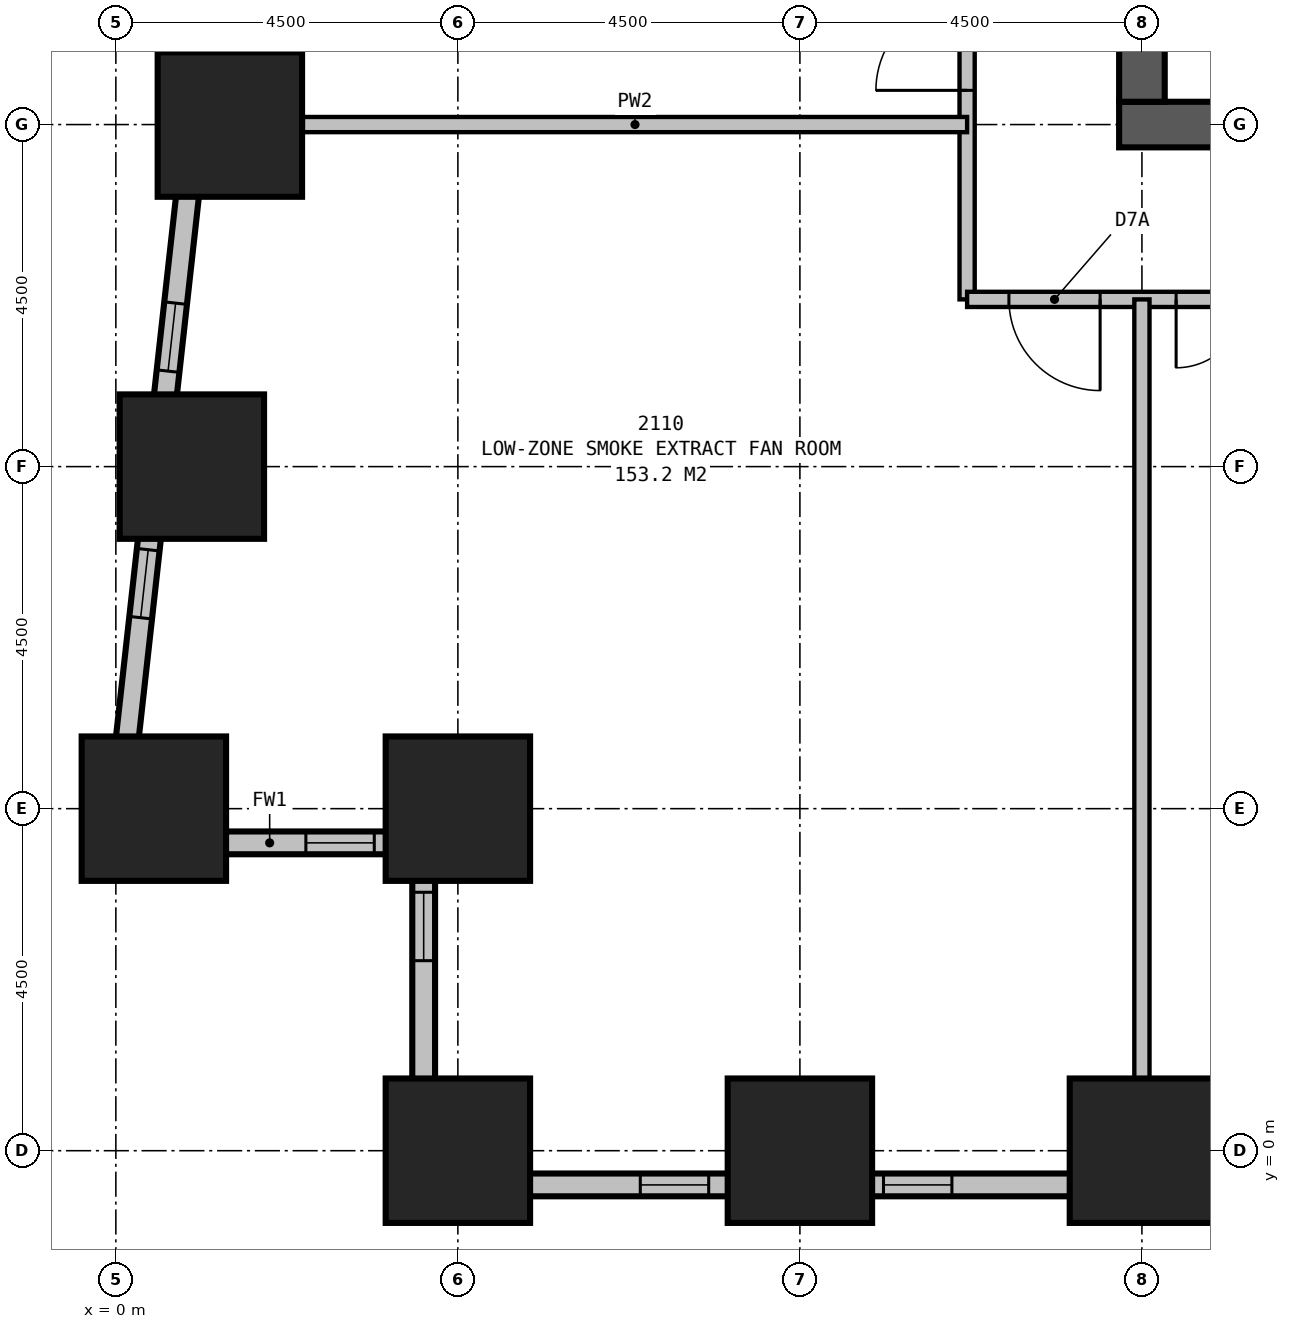
"""IFC4 building model, lengths in metres.
Left out: names, types, materials, properties, quantities, classifications, styles, units other than length and angle.
Written with IfcOpenShell. Run it as: python <this file> out.ifc"""

import sys

from ifc_helpers import new_model, si_unit, direction, frame, frame_2d, origin, origin_2d, place, context, subcontext, project, spatial, rectangle, extrude, element, fill, save


model = new_model("IFC4")
c1 = context("Model", 3, precision=1e-05, world=origin(), true_north=direction((0.0, 1.0)))
c2 = subcontext(c1, "Body", "Model", "MODEL_VIEW")
j1 = project(units=[si_unit("LENGTHUNIT", "METRE"), si_unit("PLANEANGLEUNIT", "RADIAN")], contexts=[c1])
p1 = place(None, origin())
s1 = spatial("IfcSite", under=j1, at=p1, CompositionType="ELEMENT")
p2 = place(p1, origin())
s2 = spatial("IfcBuilding", under=s1, at=p2, CompositionType="ELEMENT")
p3 = place(p2, frame((0.0, 0.0, 85.7)))
s3 = spatial("IfcBuildingStorey", under=s2, at=p3, CompositionType="ELEMENT", Elevation=85.7)
for number, where, z_axis, x_axis in (
    (1, (0.5, 4.5, 0.0), (0.0, 0.0, 1.0), (1.0, 0.0, 0.0)),
    (2, (4.5, 4.5, 0.0), (0.0, 0.0, 1.0), (1.0, 0.0, 0.0)),
    (3, (4.5, 0.0, 0.0), (0.0, 0.0, 1.0), (1.0, 0.0, 0.0)),
    (4, (9.0, 0.0, 0.0), (0.0, 0.0, 1.0), (1.0, 0.0, 0.0)),
    (5, (13.5, 0.0, 0.0), (0.0, 0.0, 1.0), (1.0, 0.0, 0.0)),
    (6, (1.5, 13.5, 0.0), (0.0, 0.0, 1.0), (1.0, 0.0, 0.0)),
    (7, (1.0, 9.0, 0.0), (0.0, 0.0, 1.0), (1.0, 0.0, 0.0)),
):
    element("IfcColumn", number, at=place(p3, frame(where, z_axis=z_axis, x_axis=x_axis)), inside=s3, PredefinedType="COLUMN", context=c2, shape_type="SweptSolid", body=[
        extrude(rectangle(XDim=1.9, YDim=1.9, at=origin_2d()), origin(), (0.0, 0.0, 1.0), 4.2),
    ])
p4 = place(p3, frame((13.2, 13.5, 0.0), z_axis=(0.0, 0.0, 1.0), x_axis=(1.0, 0.0, 0.0)))
e8 = element("IfcWall", 8, at=p4, inside=s3, PredefinedType="SHEAR", context=c2, shape_type="SweptSolid", body=[
    extrude(rectangle(XDim=23.1, YDim=0.6, at=frame_2d((11.55, 0.0))), origin(), (0.0, 0.0, 1.0), 4.2),
])
p5 = place(p3, frame((13.5, 16.5, 0.0), z_axis=(0.0, 0.0, 1.0), x_axis=(0.0, -1.0, 0.0)))
e9 = element("IfcWall", 9, at=p5, inside=s3, PredefinedType="SHEAR", context=c2, shape_type="SweptSolid", body=[
    extrude(rectangle(XDim=2.7, YDim=0.6, at=frame_2d((1.35, 0.0))), origin(), (0.0, 0.0, 1.0), 4.2),
])
p6 = place(p3, frame((-0.153, 4.05, 0.0), z_axis=(0.0, 0.0, 1.0), x_axis=(1.0, 0.0, 0.0)))
e10 = element("IfcWall", 10, at=p6, inside=s3, PredefinedType="STANDARD", context=c2, shape_type="SweptSolid", body=[
    extrude(rectangle(XDim=4.353, YDim=0.3, at=frame_2d((2.176, 0.0))), origin(), (0.0, 0.0, 1.0), 2.85),
])
p7 = place(p6, frame((2.653, 0.0, 0.3)))
e11 = element("IfcOpeningElement", 11, at=p7, cuts=e10, PredefinedType="OPENING", context=c2, shape_type="SweptSolid", body=[
    extrude(rectangle(XDim=0.9, YDim=1.2, at=frame_2d((0.45, 0.6))), frame((0.0, 0.16, 0.0), z_axis=(0.0, -1.0, 0.0), x_axis=(1.0, 0.0, 0.0)), (0.0, 0.0, 1.0), 0.32),
])
p8 = place(p3, frame((4.05, 4.2, 0.0), z_axis=(0.0, 0.0, 1.0), x_axis=(0.0, -1.0, 0.0)))
e12 = element("IfcWall", 12, at=p8, inside=s3, PredefinedType="STANDARD", context=c2, shape_type="SweptSolid", body=[
    extrude(rectangle(XDim=4.8, YDim=0.3, at=frame_2d((2.4, 0.0))), origin(), (0.0, 0.0, 1.0), 2.85),
])
p9 = place(p8, frame((0.8, 0.0, 0.5)))
e13 = element("IfcOpeningElement", 13, at=p9, cuts=e12, PredefinedType="OPENING", context=c2, shape_type="SweptSolid", body=[
    extrude(rectangle(XDim=0.9, YDim=1.2, at=frame_2d((0.45, 0.6))), frame((0.0, 0.16, 0.0), z_axis=(0.0, -1.0, 0.0), x_axis=(1.0, 0.0, 0.0)), (0.0, 0.0, 1.0), 0.32),
])
p10 = place(p3, frame((3.9, -0.45, 0.0), z_axis=(0.0, 0.0, 1.0), x_axis=(1.0, 0.0, 0.0)))
e14 = element("IfcWall", 14, at=p10, inside=s3, PredefinedType="STANDARD", context=c2, shape_type="SweptSolid", body=[
    extrude(rectangle(XDim=41.7, YDim=0.3, at=frame_2d((20.85, 0.0))), origin(), (0.0, 0.0, 1.0), 2.85),
])
p11 = place(p10, frame((3.0, 0.0, 0.5)))
e15 = element("IfcOpeningElement", 15, at=p11, cuts=e14, PredefinedType="OPENING", context=c2, shape_type="SweptSolid", body=[
    extrude(rectangle(XDim=0.9, YDim=1.2, at=frame_2d((0.45, 0.6))), frame((0.0, 0.16, 0.0), z_axis=(0.0, -1.0, 0.0), x_axis=(1.0, 0.0, 0.0)), (0.0, 0.0, 1.0), 0.32),
])
p12 = place(p10, frame((6.2, 0.0, 0.5)))
e16 = element("IfcOpeningElement", 16, at=p12, cuts=e14, PredefinedType="OPENING", context=c2, shape_type="SweptSolid", body=[
    extrude(rectangle(XDim=0.9, YDim=1.2, at=frame_2d((0.45, 0.6))), frame((0.0, 0.16, 0.0), z_axis=(0.0, -1.0, 0.0), x_axis=(1.0, 0.0, 0.0)), (0.0, 0.0, 1.0), 0.32),
])
p13 = place(p10, frame((12.0, 0.0, 0.5)))
e17 = element("IfcOpeningElement", 17, at=p13, cuts=e14, PredefinedType="OPENING", context=c2, shape_type="SweptSolid", body=[
    extrude(rectangle(XDim=0.9, YDim=1.2, at=frame_2d((0.45, 0.6))), frame((0.0, 0.16, 0.0), z_axis=(0.0, -1.0, 0.0), x_axis=(1.0, 0.0, 0.0)), (0.0, 0.0, 1.0), 0.32),
])
p14 = place(p10, frame((15.2, 0.0, 0.5)))
e18 = element("IfcOpeningElement", 18, at=p14, cuts=e14, PredefinedType="OPENING", context=c2, shape_type="SweptSolid", body=[
    extrude(rectangle(XDim=0.9, YDim=1.2, at=frame_2d((0.45, 0.6))), frame((0.0, 0.16, 0.0), z_axis=(0.0, -1.0, 0.0), x_axis=(1.0, 0.0, 0.0)), (0.0, 0.0, 1.0), 0.32),
])
p15 = place(p10, frame((21.0, 0.0, 0.5)))
e19 = element("IfcOpeningElement", 19, at=p15, cuts=e14, PredefinedType="OPENING", context=c2, shape_type="SweptSolid", body=[
    extrude(rectangle(XDim=0.9, YDim=1.2, at=frame_2d((0.45, 0.6))), frame((0.0, 0.16, 0.0), z_axis=(0.0, -1.0, 0.0), x_axis=(1.0, 0.0, 0.0)), (0.0, 0.0, 1.0), 0.32),
])
p16 = place(p10, frame((24.2, 0.0, 0.5)))
e20 = element("IfcOpeningElement", 20, at=p16, cuts=e14, PredefinedType="OPENING", context=c2, shape_type="SweptSolid", body=[
    extrude(rectangle(XDim=0.9, YDim=1.2, at=frame_2d((0.45, 0.6))), frame((0.0, 0.16, 0.0), z_axis=(0.0, -1.0, 0.0), x_axis=(1.0, 0.0, 0.0)), (0.0, 0.0, 1.0), 0.32),
])
p17 = place(p10, frame((30.0, 0.0, 0.5)))
e21 = element("IfcOpeningElement", 21, at=p17, cuts=e14, PredefinedType="OPENING", context=c2, shape_type="SweptSolid", body=[
    extrude(rectangle(XDim=0.9, YDim=1.2, at=frame_2d((0.45, 0.6))), frame((0.0, 0.16, 0.0), z_axis=(0.0, -1.0, 0.0), x_axis=(1.0, 0.0, 0.0)), (0.0, 0.0, 1.0), 0.32),
])
p18 = place(p10, frame((33.2, 0.0, 0.5)))
e22 = element("IfcOpeningElement", 22, at=p18, cuts=e14, PredefinedType="OPENING", context=c2, shape_type="SweptSolid", body=[
    extrude(rectangle(XDim=0.9, YDim=1.2, at=frame_2d((0.45, 0.6))), frame((0.0, 0.16, 0.0), z_axis=(0.0, -1.0, 0.0), x_axis=(1.0, 0.0, 0.0)), (0.0, 0.0, 1.0), 0.32),
])
p19 = place(p10, frame((39.0, 0.0, 0.5)))
e23 = element("IfcOpeningElement", 23, at=p19, cuts=e14, PredefinedType="OPENING", context=c2, shape_type="SweptSolid", body=[
    extrude(rectangle(XDim=0.9, YDim=1.2, at=frame_2d((0.45, 0.6))), frame((0.0, 0.16, 0.0), z_axis=(0.0, -1.0, 0.0), x_axis=(1.0, 0.0, 0.0)), (0.0, 0.0, 1.0), 0.32),
])
p20 = place(p3, frame((3.614, 36.599, 0.0), z_axis=(0.0, 0.0, 1.0), x_axis=(-0.110429082637, -0.993884006164, 0.0)))
e24 = element("IfcWall", 24, at=p20, inside=s3, PredefinedType="STANDARD", context=c2, shape_type="SweptSolid", body=[
    extrude(rectangle(XDim=32.899, YDim=0.3, at=frame_2d((16.45, 0.0))), origin(), (0.0, 0.0, 1.0), 2.85),
])
p21 = place(p20, frame((1.703, 0.0, 0.5)))
e25 = element("IfcOpeningElement", 25, at=p21, cuts=e24, PredefinedType="OPENING", context=c2, shape_type="SweptSolid", body=[
    extrude(rectangle(XDim=0.9, YDim=1.2, at=frame_2d((0.45, 0.6))), frame((0.0, 0.16, 0.0), z_axis=(0.0, -1.0, 0.0), x_axis=(1.0, 0.0, 0.0)), (0.0, 0.0, 1.0), 0.32),
])
p22 = place(p20, frame((7.495, 0.0, 0.5)))
e26 = element("IfcOpeningElement", 26, at=p22, cuts=e24, PredefinedType="OPENING", context=c2, shape_type="SweptSolid", body=[
    extrude(rectangle(XDim=0.9, YDim=1.2, at=frame_2d((0.45, 0.6))), frame((0.0, 0.16, 0.0), z_axis=(0.0, -1.0, 0.0), x_axis=(1.0, 0.0, 0.0)), (0.0, 0.0, 1.0), 0.32),
])
p23 = place(p20, frame((10.758, 0.0, 0.5)))
e27 = element("IfcOpeningElement", 27, at=p23, cuts=e24, PredefinedType="OPENING", context=c2, shape_type="SweptSolid", body=[
    extrude(rectangle(XDim=0.9, YDim=1.2, at=frame_2d((0.45, 0.6))), frame((0.0, 0.16, 0.0), z_axis=(0.0, -1.0, 0.0), x_axis=(1.0, 0.0, 0.0)), (0.0, 0.0, 1.0), 0.32),
])
p24 = place(p20, frame((16.55, 0.0, 0.5)))
e28 = element("IfcOpeningElement", 28, at=p24, cuts=e24, PredefinedType="OPENING", context=c2, shape_type="SweptSolid", body=[
    extrude(rectangle(XDim=0.9, YDim=1.2, at=frame_2d((0.45, 0.6))), frame((0.0, 0.16, 0.0), z_axis=(0.0, -1.0, 0.0), x_axis=(1.0, 0.0, 0.0)), (0.0, 0.0, 1.0), 0.32),
])
p25 = place(p20, frame((19.814, 0.0, 0.5)))
e29 = element("IfcOpeningElement", 29, at=p25, cuts=e24, PredefinedType="OPENING", context=c2, shape_type="SweptSolid", body=[
    extrude(rectangle(XDim=0.9, YDim=1.2, at=frame_2d((0.45, 0.6))), frame((0.0, 0.16, 0.0), z_axis=(0.0, -1.0, 0.0), x_axis=(1.0, 0.0, 0.0)), (0.0, 0.0, 1.0), 0.32),
])
p26 = place(p20, frame((25.605, 0.0, 0.5)))
e30 = element("IfcOpeningElement", 30, at=p26, cuts=e24, PredefinedType="OPENING", context=c2, shape_type="SweptSolid", body=[
    extrude(rectangle(XDim=0.9, YDim=1.2, at=frame_2d((0.45, 0.6))), frame((0.0, 0.16, 0.0), z_axis=(0.0, -1.0, 0.0), x_axis=(1.0, 0.0, 0.0)), (0.0, 0.0, 1.0), 0.32),
])
p27 = place(p20, frame((28.869, 0.0, 0.5)))
e31 = element("IfcOpeningElement", 31, at=p27, cuts=e24, PredefinedType="OPENING", context=c2, shape_type="SweptSolid", body=[
    extrude(rectangle(XDim=0.9, YDim=1.2, at=frame_2d((0.45, 0.6))), frame((0.0, 0.16, 0.0), z_axis=(0.0, -1.0, 0.0), x_axis=(1.0, 0.0, 0.0)), (0.0, 0.0, 1.0), 0.32),
])
p28 = place(p3, frame((11.2, 11.2, 0.0), z_axis=(0.0, 0.0, 1.0), x_axis=(1.0, 0.0, 0.0)))
e32 = element("IfcWall", 32, at=p28, inside=s3, PredefinedType="PARTITIONING", context=c2, shape_type="SweptSolid", body=[
    extrude(rectangle(XDim=27.1, YDim=0.2, at=frame_2d((13.55, 0.0))), origin(), (0.0, 0.0, 1.0), 3.95),
])
p29 = place(p28, frame((4.55, 0.0, 0.0), z_axis=(0.0, 0.0, 1.0), x_axis=(-1.0, 0.0, 0.0)))
e33 = element("IfcOpeningElement", 33, at=p29, cuts=e32, PredefinedType="OPENING", context=c2, shape_type="SweptSolid", body=[
    extrude(rectangle(XDim=1.8, YDim=2.4, at=frame_2d((0.9, 1.2))), frame((0.0, 0.11, 0.0), z_axis=(0.0, -1.0, 0.0), x_axis=(1.0, 0.0, 0.0)), (0.0, 0.0, 1.0), 0.22),
])
p30 = place(p28, frame((22.0, 0.0, 0.0), z_axis=(0.0, 0.0, 1.0), x_axis=(-1.0, 0.0, 0.0)))
e34 = element("IfcOpeningElement", 34, at=p30, cuts=e32, PredefinedType="OPENING", context=c2, shape_type="SweptSolid", body=[
    extrude(rectangle(XDim=1.0, YDim=2.1, at=frame_2d((0.5, 1.05))), frame((0.0, 0.11, 0.0), z_axis=(0.0, -1.0, 0.0), x_axis=(1.0, 0.0, 0.0)), (0.0, 0.0, 1.0), 0.22),
])
p31 = place(p28, frame((24.1, 0.0, 0.0), z_axis=(0.0, 0.0, 1.0), x_axis=(-1.0, 0.0, 0.0)))
e35 = element("IfcOpeningElement", 35, at=p31, cuts=e32, PredefinedType="OPENING", context=c2, shape_type="SweptSolid", body=[
    extrude(rectangle(XDim=1.0, YDim=2.1, at=frame_2d((0.5, 1.05))), frame((0.0, 0.11, 0.0), z_axis=(0.0, -1.0, 0.0), x_axis=(1.0, 0.0, 0.0)), (0.0, 0.0, 1.0), 0.22),
])
p32 = place(p28, frame((1.75, 0.0, 0.0), z_axis=(0.0, 0.0, 1.0), x_axis=(-1.0, 0.0, 0.0)))
e36 = element("IfcOpeningElement", 36, at=p32, cuts=e32, PredefinedType="OPENING", context=c2, shape_type="SweptSolid", body=[
    extrude(rectangle(XDim=1.2, YDim=2.1, at=frame_2d((0.6, 1.05))), frame((0.0, 0.11, 0.0), z_axis=(0.0, -1.0, 0.0), x_axis=(1.0, 0.0, 0.0)), (0.0, 0.0, 1.0), 0.22),
])
p33 = place(p28, frame((26.55, 0.0, 0.0), z_axis=(0.0, 0.0, 1.0), x_axis=(-1.0, 0.0, 0.0)))
e37 = element("IfcOpeningElement", 37, at=p33, cuts=e32, PredefinedType="OPENING", context=c2, shape_type="SweptSolid", body=[
    extrude(rectangle(XDim=1.2, YDim=2.1, at=frame_2d((0.6, 1.05))), frame((0.0, 0.11, 0.0), z_axis=(0.0, -1.0, 0.0), x_axis=(1.0, 0.0, 0.0)), (0.0, 0.0, 1.0), 0.22),
])
p34 = place(p3, frame((11.2, 11.2, 0.0), z_axis=(0.0, 0.0, 1.0), x_axis=(0.0, 1.0, 0.0)))
e38 = element("IfcWall", 38, at=p34, inside=s3, PredefinedType="PARTITIONING", context=c2, shape_type="SweptSolid", body=[
    extrude(rectangle(XDim=18.1, YDim=0.2, at=frame_2d((9.05, 0.0))), origin(), (0.0, 0.0, 1.0), 3.95),
])
p35 = place(p34, frame((2.75, 0.0, 0.0)))
e39 = element("IfcOpeningElement", 39, at=p35, cuts=e38, PredefinedType="OPENING", context=c2, shape_type="SweptSolid", body=[
    extrude(rectangle(XDim=1.2, YDim=2.1, at=frame_2d((0.6, 1.05))), frame((0.0, 0.11, 0.0), z_axis=(0.0, -1.0, 0.0), x_axis=(1.0, 0.0, 0.0)), (0.0, 0.0, 1.0), 0.22),
])
p36 = place(p34, frame((11.75, 0.0, 0.0)))
e40 = element("IfcOpeningElement", 40, at=p36, cuts=e38, PredefinedType="OPENING", context=c2, shape_type="SweptSolid", body=[
    extrude(rectangle(XDim=1.0, YDim=2.1, at=frame_2d((0.5, 1.05))), frame((0.0, 0.11, 0.0), z_axis=(0.0, -1.0, 0.0), x_axis=(1.0, 0.0, 0.0)), (0.0, 0.0, 1.0), 0.22),
])
p37 = place(p3, frame((13.5, 11.2, 0.0), z_axis=(0.0, 0.0, 1.0), x_axis=(0.0, -1.0, 0.0)))
e41 = element("IfcWall", 41, at=p37, inside=s3, PredefinedType="PARTITIONING", context=c2, shape_type="SweptSolid", body=[
    extrude(rectangle(XDim=10.25, YDim=0.2, at=frame_2d((5.125, 0.0))), origin(), (0.0, 0.0, 1.0), 2.95),
])
p38 = place(p3, frame((11.2, 13.5, 0.0), z_axis=(0.0, 0.0, 1.0), x_axis=(-1.0, 0.0, 0.0)))
e42 = element("IfcWall", 42, at=p38, inside=s3, PredefinedType="PARTITIONING", context=c2, shape_type="SweptSolid", body=[
    extrude(rectangle(XDim=8.739, YDim=0.2, at=frame_2d((4.37, 0.0))), origin(), (0.0, 0.0, 1.0), 2.65),
])
p39 = place(p7, origin())
e43 = element("IfcWindow", 43, at=p39, inside=s3, PartitioningType="SINGLE_PANEL", PredefinedType="USERDEFINED", context=c2, shape_type="SweptSolid", body=[
    extrude(rectangle(XDim=0.9, YDim=1.2, at=frame_2d((0.45, 0.6))), frame((0.0, 0.03, 0.0), z_axis=(0.0, -1.0, 0.0), x_axis=(1.0, 0.0, 0.0)), (0.0, 0.0, 1.0), 0.06),
])
fill(e11, e43)
p40 = place(p9, origin())
e44 = element("IfcWindow", 44, at=p40, inside=s3, PartitioningType="SINGLE_PANEL", PredefinedType="USERDEFINED", context=c2, shape_type="SweptSolid", body=[
    extrude(rectangle(XDim=0.9, YDim=1.2, at=frame_2d((0.45, 0.6))), frame((0.0, 0.03, 0.0), z_axis=(0.0, -1.0, 0.0), x_axis=(1.0, 0.0, 0.0)), (0.0, 0.0, 1.0), 0.06),
])
fill(e13, e44)
p41 = place(p11, origin())
e45 = element("IfcWindow", 45, at=p41, inside=s3, PartitioningType="SINGLE_PANEL", PredefinedType="USERDEFINED", context=c2, shape_type="SweptSolid", body=[
    extrude(rectangle(XDim=0.9, YDim=1.2, at=frame_2d((0.45, 0.6))), frame((0.0, 0.03, 0.0), z_axis=(0.0, -1.0, 0.0), x_axis=(1.0, 0.0, 0.0)), (0.0, 0.0, 1.0), 0.06),
])
fill(e15, e45)
p42 = place(p12, origin())
e46 = element("IfcWindow", 46, at=p42, inside=s3, PartitioningType="SINGLE_PANEL", PredefinedType="USERDEFINED", context=c2, shape_type="SweptSolid", body=[
    extrude(rectangle(XDim=0.9, YDim=1.2, at=frame_2d((0.45, 0.6))), frame((0.0, 0.03, 0.0), z_axis=(0.0, -1.0, 0.0), x_axis=(1.0, 0.0, 0.0)), (0.0, 0.0, 1.0), 0.06),
])
fill(e16, e46)
p43 = place(p26, origin())
e47 = element("IfcWindow", 47, at=p43, inside=s3, PartitioningType="SINGLE_PANEL", PredefinedType="USERDEFINED", context=c2, shape_type="SweptSolid", body=[
    extrude(rectangle(XDim=0.9, YDim=1.2, at=frame_2d((0.45, 0.6))), frame((0.0, 0.03, 0.0), z_axis=(0.0, -1.0, 0.0), x_axis=(1.0, 0.0, 0.0)), (0.0, 0.0, 1.0), 0.06),
])
fill(e30, e47)
p44 = place(p27, origin())
e48 = element("IfcWindow", 48, at=p44, inside=s3, PartitioningType="SINGLE_PANEL", PredefinedType="USERDEFINED", context=c2, shape_type="SweptSolid", body=[
    extrude(rectangle(XDim=0.9, YDim=1.2, at=frame_2d((0.45, 0.6))), frame((0.0, 0.03, 0.0), z_axis=(0.0, -1.0, 0.0), x_axis=(1.0, 0.0, 0.0)), (0.0, 0.0, 1.0), 0.06),
])
fill(e31, e48)
p45 = place(p29, origin())
e49 = element("IfcDoor", 49, at=p45, inside=s3, OperationType="DOUBLE_DOOR_SINGLE_SWING", PredefinedType="DOOR", context=c2, shape_type="SweptSolid", body=[
    extrude(rectangle(XDim=1.8, YDim=2.4, at=frame_2d((0.9, 1.2))), frame((0.0, 0.025, 0.0), z_axis=(0.0, -1.0, 0.0), x_axis=(1.0, 0.0, 0.0)), (0.0, 0.0, 1.0), 0.05),
])
fill(e33, e49)
p46 = place(p32, origin())
e50 = element("IfcDoor", 50, at=p46, inside=s3, OperationType="SINGLE_SWING_LEFT", PredefinedType="DOOR", context=c2, shape_type="SweptSolid", body=[
    extrude(rectangle(XDim=1.2, YDim=2.1, at=frame_2d((0.6, 1.05))), frame((0.0, 0.025, 0.0), z_axis=(0.0, -1.0, 0.0), x_axis=(1.0, 0.0, 0.0)), (0.0, 0.0, 1.0), 0.05),
])
fill(e36, e50)
p47 = place(p35, origin())
e51 = element("IfcDoor", 51, at=p47, inside=s3, OperationType="SINGLE_SWING_LEFT", PredefinedType="DOOR", context=c2, shape_type="SweptSolid", body=[
    extrude(rectangle(XDim=1.2, YDim=2.1, at=frame_2d((0.6, 1.05))), frame((0.0, 0.025, 0.0), z_axis=(0.0, -1.0, 0.0), x_axis=(1.0, 0.0, 0.0)), (0.0, 0.0, 1.0), 0.05),
])
fill(e39, e51)
save(model, sys.argv[1])
